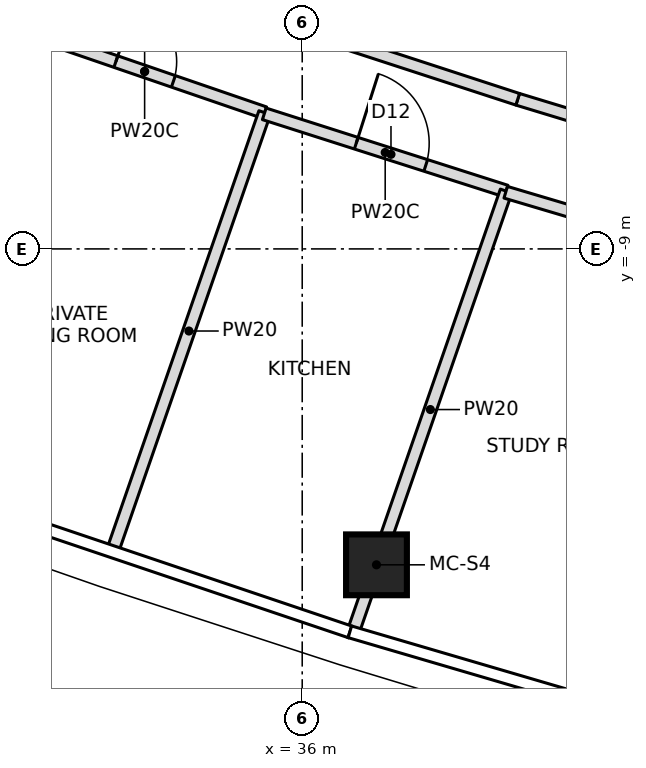
"""IFC4 building model, lengths in metres.
Left out: names, types, materials, properties, quantities, classifications, styles, units other than length and angle.
Written with IfcOpenShell. Run it as: python <this file> out.ifc"""

import sys

from ifc_helpers import new_model, si_unit, direction, frame, frame_2d, origin, origin_2d, place, context, subcontext, project, spatial, rectangle, extrude, element, fill, save


model = new_model("IFC4")
c1 = context("Model", 3, precision=1e-05, world=origin(), true_north=direction((0.0, 1.0)))
c2 = subcontext(c1, "Body", "Model", "MODEL_VIEW")
j1 = project(units=[si_unit("LENGTHUNIT", "METRE"), si_unit("PLANEANGLEUNIT", "RADIAN")], contexts=[c1])
p1 = place(None, origin())
s1 = spatial("IfcSite", under=j1, at=p1, CompositionType="ELEMENT")
p2 = place(p1, origin())
s2 = spatial("IfcBuilding", under=s1, at=p2, CompositionType="ELEMENT")
p3 = place(p2, frame((0.0, 0.0, 313.2)))
s3 = spatial("IfcBuildingStorey", under=s2, at=p3, CompositionType="ELEMENT", Elevation=313.2)
p4 = place(p3, frame((37.221, -14.196, 0.0), z_axis=(0.0, 0.0, 1.0), x_axis=(1.0, 0.0, 0.0)))
e1 = element("IfcColumn", 1, at=p4, inside=s3, PredefinedType="COLUMN", context=c2, shape_type="SweptSolid", body=[
    extrude(rectangle(XDim=1.0, YDim=1.0, at=origin_2d()), origin(), (0.0, 0.0, 1.0), 5.4),
])
p5 = place(p3, frame((31.434, -5.404, 0.0), z_axis=(0.0, 0.0, 1.0), x_axis=(0.945814630363, -0.324707075672, 0.0)))
e2 = element("IfcWall", 2, at=p5, inside=s3, PredefinedType="PARTITIONING", context=c2, shape_type="SweptSolid", body=[
    extrude(rectangle(XDim=4.174, YDim=0.2, at=frame_2d((2.087, 0.0))), origin(), (0.0, 0.0, 1.0), 5.1),
])
p6 = place(p5, frame((1.587, 0.0, 0.0)))
e3 = element("IfcOpeningElement", 3, at=p6, cuts=e2, PredefinedType="OPENING", context=c2, shape_type="SweptSolid", body=[
    extrude(rectangle(XDim=1.0, YDim=2.1, at=frame_2d((0.5, 1.05))), frame((0.0, 0.11, 0.0), z_axis=(0.0, -1.0, 0.0), x_axis=(1.0, 0.0, 0.0)), (0.0, 0.0, 1.0), 0.22),
])
p7 = place(p3, frame((32.891, -13.941, 0.0), z_axis=(0.0, 0.0, 1.0), x_axis=(0.327699570064, 0.944781981083, 0.0)))
e4 = element("IfcWall", 4, at=p7, inside=s3, PredefinedType="PARTITIONING", context=c2, shape_type="SweptSolid", body=[
    extrude(rectangle(XDim=7.601, YDim=0.2, at=frame_2d((3.801, 0.0))), origin(), (0.0, 0.0, 1.0), 5.1),
])
p8 = place(p3, frame((35.376, -6.779, 0.0), z_axis=(0.0, 0.0, 1.0), x_axis=(0.952572699992, -0.304311109278, 0.0)))
e5 = element("IfcWall", 5, at=p8, inside=s3, PredefinedType="PARTITIONING", context=c2, shape_type="SweptSolid", body=[
    extrude(rectangle(XDim=4.176, YDim=0.2, at=frame_2d((2.088, 0.0))), origin(), (0.0, 0.0, 1.0), 5.1),
])
p9 = place(p8, frame((1.588, 0.0, 0.0)))
e6 = element("IfcOpeningElement", 6, at=p9, cuts=e5, PredefinedType="OPENING", context=c2, shape_type="SweptSolid", body=[
    extrude(rectangle(XDim=1.2, YDim=2.1, at=frame_2d((0.6, 1.05))), frame((0.0, 0.11, 0.0), z_axis=(0.0, -1.0, 0.0), x_axis=(1.0, 0.0, 0.0)), (0.0, 0.0, 1.0), 0.22),
])
p10 = place(p3, frame((36.861, -15.235, 0.0), z_axis=(0.0, 0.0, 1.0), x_axis=(0.327741126954, 0.944767565967, 0.0)))
e7 = element("IfcWall", 7, at=p10, inside=s3, PredefinedType="PARTITIONING", context=c2, shape_type="SweptSolid", body=[
    extrude(rectangle(XDim=7.606, YDim=0.2, at=frame_2d((3.803, 0.0))), origin(), (0.0, 0.0, 1.0), 5.1),
])
p11 = place(p3, frame((39.347, -8.068, 0.0), z_axis=(0.0, 0.0, 1.0), x_axis=(0.958623301067, -0.284677653938, 0.0)))
e8 = element("IfcWall", 8, at=p11, inside=s3, PredefinedType="PARTITIONING", context=c2, shape_type="SweptSolid", body=[
    extrude(rectangle(XDim=4.02, YDim=0.2, at=frame_2d((2.01, 0.0))), origin(), (0.0, 0.0, 1.0), 5.1),
])
p12 = place(p11, frame((1.51, 0.0, 0.0)))
e9 = element("IfcOpeningElement", 9, at=p12, cuts=e8, PredefinedType="OPENING", context=c2, shape_type="SweptSolid", body=[
    extrude(rectangle(XDim=1.0, YDim=2.1, at=frame_2d((0.5, 1.05))), frame((0.0, 0.11, 0.0), z_axis=(0.0, -1.0, 0.0), x_axis=(1.0, 0.0, 0.0)), (0.0, 0.0, 1.0), 0.22),
])
p13 = place(p3, frame((41.714, -7.199, 0.0), z_axis=(0.0, 0.0, 1.0), x_axis=(-0.956735130354, 0.290960289981, 0.0)))
e10 = element("IfcWall", 10, at=p13, inside=s3, PredefinedType="PARTITIONING", context=c2, shape_type="SweptSolid", body=[
    extrude(rectangle(XDim=2.268, YDim=0.2, at=frame_2d((1.134, 0.0))), origin(), (0.0, 0.0, 1.0), 5.1),
])
p14 = place(p3, frame((39.544, -6.539, 0.0), z_axis=(0.0, 0.0, 1.0), x_axis=(-0.950700567571, 0.310110352648, 0.0)))
e11 = element("IfcWall", 11, at=p14, inside=s3, PredefinedType="PARTITIONING", context=c2, shape_type="SweptSolid", body=[
    extrude(rectangle(XDim=3.955, YDim=0.2, at=frame_2d((1.978, 0.0))), origin(), (0.0, 0.0, 1.0), 5.1),
])
p15 = place(p6, origin())
e12 = element("IfcDoor", 12, at=p15, inside=s3, OperationType="SINGLE_SWING_RIGHT", PredefinedType="DOOR", context=c2, shape_type="SweptSolid", body=[
    extrude(rectangle(XDim=1.0, YDim=2.1, at=frame_2d((0.5, 1.05))), frame((0.0, 0.025, 0.0), z_axis=(0.0, -1.0, 0.0), x_axis=(1.0, 0.0, 0.0)), (0.0, 0.0, 1.0), 0.05),
])
fill(e3, e12)
p16 = place(p9, origin())
e13 = element("IfcDoor", 13, at=p16, inside=s3, OperationType="SINGLE_SWING_RIGHT", PredefinedType="DOOR", context=c2, shape_type="SweptSolid", body=[
    extrude(rectangle(XDim=1.2, YDim=2.1, at=frame_2d((0.6, 1.05))), frame((0.0, 0.025, 0.0), z_axis=(0.0, -1.0, 0.0), x_axis=(1.0, 0.0, 0.0)), (0.0, 0.0, 1.0), 0.05),
])
fill(e6, e13)
save(model, sys.argv[1])
